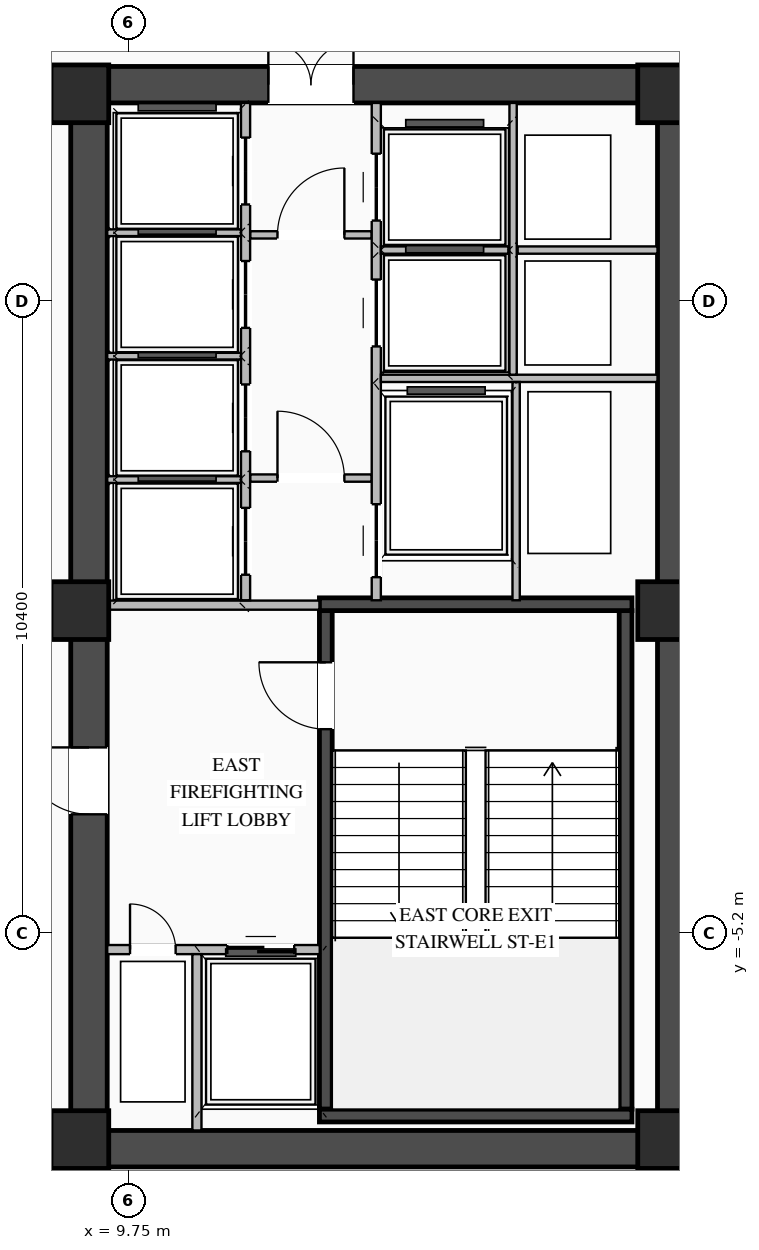
"""IFC4 building model, lengths in metres.
Left out: names, types, materials, properties, quantities, classifications, styles, units other than length and angle.
Written with IfcOpenShell. Run it as: python <this file> out.ifc"""

import sys

from ifc_helpers import new_model, si_unit, direction, frame, frame_2d, origin, origin_2d, place, context, subcontext, project, spatial, rectangle, extrude, element, fill, save


model = new_model("IFC4")
c1 = context("Model", 3, precision=1e-05, world=origin(), true_north=direction((0.0, 1.0)))
c2 = subcontext(c1, "Body", "Model", "MODEL_VIEW")
j1 = project(units=[si_unit("LENGTHUNIT", "METRE"), si_unit("PLANEANGLEUNIT", "RADIAN")], contexts=[c1])
p1 = place(None, origin())
s1 = spatial("IfcSite", under=j1, at=p1, CompositionType="ELEMENT")
p2 = place(p1, origin())
s2 = spatial("IfcBuilding", under=s1, at=p2, CompositionType="ELEMENT")
p3 = place(p2, frame((0.0, 0.0, 116.65)))
s3 = spatial("IfcBuildingStorey", under=s2, at=p3, CompositionType="ELEMENT", Elevation=116.65)
p4 = place(p3, frame((8.8, -8.75, 0.0), z_axis=(0.0, 0.0, 1.0), x_axis=(1.0, 0.0, 0.0)))
e1 = element("IfcWall", 1, at=p4, inside=s3, PredefinedType="SHEAR", context=c2, shape_type="SweptSolid", body=[
    extrude(rectangle(XDim=10.25, YDim=0.6, at=frame_2d((5.125, 0.0))), origin(), (0.0, 0.0, 1.0), 4.02),
])
p5 = place(p3, frame((8.8, 8.75, 0.0), z_axis=(0.0, 0.0, 1.0), x_axis=(1.0, 0.0, 0.0)))
e2 = element("IfcWall", 2, at=p5, inside=s3, PredefinedType="SHEAR", context=c2, shape_type="SweptSolid", body=[
    extrude(rectangle(XDim=10.25, YDim=0.6, at=frame_2d((5.125, 0.0))), origin(), (0.0, 0.0, 1.0), 4.02),
])
p6 = place(p5, frame((3.25, 0.0, 0.0)))
e3 = element("IfcOpeningElement", 3, at=p6, cuts=e2, PredefinedType="OPENING", context=c2, shape_type="SweptSolid", body=[
    extrude(rectangle(XDim=1.4, YDim=2.05, at=frame_2d((0.7, 1.025))), frame((0.0, 0.31, 0.0), z_axis=(0.0, -1.0, 0.0), x_axis=(1.0, 0.0, 0.0)), (0.0, 0.0, 1.0), 0.62),
])
p7 = place(p3, frame((9.1, -8.45, 0.0), z_axis=(0.0, 0.0, 1.0), x_axis=(0.0, 1.0, 0.0)))
e4 = element("IfcWall", 4, at=p7, inside=s3, PredefinedType="SHEAR", context=c2, shape_type="SweptSolid", body=[
    extrude(rectangle(XDim=16.9, YDim=0.6, at=frame_2d((8.45, 0.0))), origin(), (0.0, 0.0, 1.0), 4.02),
])
p8 = place(p7, frame((5.2, 0.0, 0.0)))
e5 = element("IfcOpeningElement", 5, at=p8, cuts=e4, PredefinedType="OPENING", context=c2, shape_type="SweptSolid", body=[
    extrude(rectangle(XDim=1.1, YDim=2.08, at=frame_2d((0.55, 1.04))), frame((0.0, 0.31, 0.0), z_axis=(0.0, -1.0, 0.0), x_axis=(1.0, 0.0, 0.0)), (0.0, 0.0, 1.0), 0.62),
])
p9 = place(p3, frame((18.75, -8.45, 0.0), z_axis=(0.0, 0.0, 1.0), x_axis=(0.0, 1.0, 0.0)))
e6 = element("IfcWall", 6, at=p9, inside=s3, PredefinedType="SHEAR", context=c2, shape_type="SweptSolid", body=[
    extrude(rectangle(XDim=16.9, YDim=0.6, at=frame_2d((8.45, 0.0))), origin(), (0.0, 0.0, 1.0), 4.02),
])
p10 = place(p3, frame((12.995, -8.1, 0.0), z_axis=(0.0, 0.0, 1.0), x_axis=(0.0, 1.0, 0.0)))
e7 = element("IfcWall", 7, at=p10, inside=s3, PredefinedType="SHEAR", context=c2, shape_type="SweptSolid", body=[
    extrude(rectangle(XDim=8.2, YDim=0.21, at=frame_2d((4.1, 0.0))), origin(), (0.0, 0.0, 1.0), 4.02),
])
p11 = place(p10, frame((6.25, 0.0, 0.0)))
e8 = element("IfcOpeningElement", 8, at=p11, cuts=e7, PredefinedType="OPENING", context=c2, shape_type="SweptSolid", body=[
    extrude(rectangle(XDim=1.1, YDim=2.15, at=frame_2d((0.55, 1.075))), frame((0.0, 0.115, 0.0), z_axis=(0.0, -1.0, 0.0), x_axis=(1.0, 0.0, 0.0)), (0.0, 0.0, 1.0), 0.23),
])
p12 = place(p3, frame((17.925, -8.1, 0.0), z_axis=(0.0, 0.0, 1.0), x_axis=(0.0, 1.0, 0.0)))
e9 = element("IfcWall", 9, at=p12, inside=s3, PredefinedType="SHEAR", context=c2, shape_type="SweptSolid", body=[
    extrude(rectangle(XDim=8.2, YDim=0.21, at=frame_2d((4.1, 0.0))), origin(), (0.0, 0.0, 1.0), 4.02),
])
for number, where, z_axis, x_axis in (
    (10, (12.89, -8.205, 0.0), (0.0, 0.0, 1.0), (1.0, 0.0, 0.0)),
    (11, (18.03, 0.205, 0.0), (0.0, 0.0, 1.0), (-1.0, 0.0, 0.0)),
):
    element("IfcWall", number, at=place(p3, frame(where, z_axis=z_axis, x_axis=x_axis)), inside=s3, PredefinedType="SHEAR", context=c2, shape_type="SweptSolid", body=[
        extrude(rectangle(XDim=5.14, YDim=0.21, at=frame_2d((2.57, 0.0))), origin(), (0.0, 0.0, 1.0), 4.02),
    ])
for number, where, z_axis, x_axis in (
    (12, (8.95, -8.6, 0.0), (0.0, 0.0, 1.0), (1.0, 0.0, 0.0)),
    (13, (8.95, 0.1, 0.0), (0.0, 0.0, 1.0), (1.0, 0.0, 0.0)),
    (14, (8.95, 8.6, 0.0), (0.0, 0.0, 1.0), (1.0, 0.0, 0.0)),
    (15, (18.6, -8.6, 0.0), (0.0, 0.0, 1.0), (1.0, 0.0, 0.0)),
    (16, (18.6, 0.1, 0.0), (0.0, 0.0, 1.0), (1.0, 0.0, 0.0)),
    (17, (18.6, 8.6, 0.0), (0.0, 0.0, 1.0), (1.0, 0.0, 0.0)),
):
    element("IfcColumn", number, at=place(p3, frame(where, z_axis=z_axis, x_axis=x_axis)), inside=s3, PredefinedType="COLUMN", context=c2, shape_type="SweptSolid", body=[
        extrude(rectangle(XDim=0.95, YDim=0.95, at=origin_2d()), origin(), (0.0, 0.0, 1.0), 4.2),
    ])
p13 = place(p3, frame((9.4, -5.475, 0.0), z_axis=(0.0, 0.0, 1.0), x_axis=(1.0, 0.0, 0.0)))
e18 = element("IfcWall", 18, at=p13, inside=s3, PredefinedType="STANDARD", context=c2, shape_type="SweptSolid", body=[
    extrude(rectangle(XDim=3.495, YDim=0.15, at=frame_2d((1.748, 0.0))), origin(), (0.0, 0.0, 1.0), 4.0),
])
p14 = place(p13, frame((1.975, 0.0, 0.0)))
e19 = element("IfcOpeningElement", 19, at=p14, cuts=e18, PredefinedType="OPENING", context=c2, shape_type="SweptSolid", body=[
    extrude(rectangle(XDim=1.1, YDim=2.15, at=frame_2d((0.55, 1.075))), frame((0.0, 0.085, 0.0), z_axis=(0.0, -1.0, 0.0), x_axis=(1.0, 0.0, 0.0)), (0.0, 0.0, 1.0), 0.17),
])
p15 = place(p13, frame((0.375, 0.0, 0.0)))
e20 = element("IfcOpeningElement", 20, at=p15, cuts=e18, PredefinedType="OPENING", context=c2, shape_type="SweptSolid", body=[
    extrude(rectangle(XDim=0.75, YDim=2.05, at=frame_2d((0.375, 1.025))), frame((0.0, 0.085, 0.0), z_axis=(0.0, -1.0, 0.0), x_axis=(1.0, 0.0, 0.0)), (0.0, 0.0, 1.0), 0.17),
])
p16 = place(p3, frame((10.875, -8.45, 0.0), z_axis=(0.0, 0.0, 1.0), x_axis=(0.0, 1.0, 0.0)))
e21 = element("IfcWall", 21, at=p16, inside=s3, PredefinedType="STANDARD", context=c2, shape_type="SweptSolid", body=[
    extrude(rectangle(XDim=2.9, YDim=0.15, at=frame_2d((1.45, 0.0))), origin(), (0.0, 0.0, 1.0), 4.0),
])
p17 = place(p3, frame((9.4, 0.19, 0.0), z_axis=(0.0, 0.0, 1.0), x_axis=(1.0, 0.0, 0.0)))
e22 = element("IfcWall", 22, at=p17, inside=s3, PredefinedType="STANDARD", context=c2, shape_type="SweptSolid", body=[
    extrude(rectangle(XDim=3.49, YDim=0.15, at=frame_2d((1.745, 0.0))), origin(), (0.0, 0.0, 1.0), 3.395),
])
p18 = place(p3, frame((11.75, 2.28, 0.0), z_axis=(0.0, 0.0, 1.0), x_axis=(1.0, 0.0, 0.0)))
e23 = element("IfcWall", 23, at=p18, inside=s3, PredefinedType="STANDARD", context=c2, shape_type="SweptSolid", body=[
    extrude(rectangle(XDim=2.0, YDim=0.12, at=frame_2d((1.0, 0.0))), origin(), (0.0, 0.0, 1.0), 4.0),
])
p19 = place(p18, frame((0.45, 0.0, 0.0)))
e24 = element("IfcOpeningElement", 24, at=p19, cuts=e23, PredefinedType="OPENING", context=c2, shape_type="SweptSolid", body=[
    extrude(rectangle(XDim=1.1, YDim=2.1, at=frame_2d((0.55, 1.05))), frame((0.0, 0.07, 0.0), z_axis=(0.0, -1.0, 0.0), x_axis=(1.0, 0.0, 0.0)), (0.0, 0.0, 1.0), 0.14),
])
p20 = place(p3, frame((11.75, 6.28, 0.0), z_axis=(0.0, 0.0, 1.0), x_axis=(1.0, 0.0, 0.0)))
e25 = element("IfcWall", 25, at=p20, inside=s3, PredefinedType="STANDARD", context=c2, shape_type="SweptSolid", body=[
    extrude(rectangle(XDim=2.0, YDim=0.12, at=frame_2d((1.0, 0.0))), origin(), (0.0, 0.0, 1.0), 4.0),
])
p21 = place(p20, frame((0.45, 0.0, 0.0)))
e26 = element("IfcOpeningElement", 26, at=p21, cuts=e25, PredefinedType="OPENING", context=c2, shape_type="SweptSolid", body=[
    extrude(rectangle(XDim=1.1, YDim=2.1, at=frame_2d((0.55, 1.05))), frame((0.0, 0.07, 0.0), z_axis=(0.0, -1.0, 0.0), x_axis=(1.0, 0.0, 0.0)), (0.0, 0.0, 1.0), 0.14),
])
p22 = place(p3, frame((11.675, 0.27, 0.0), z_axis=(0.0, 0.0, 1.0), x_axis=(0.0, 1.0, 0.0)))
e27 = element("IfcWall", 27, at=p22, inside=s3, PredefinedType="STANDARD", context=c2, shape_type="SweptSolid", body=[
    extrude(rectangle(XDim=8.18, YDim=0.15, at=frame_2d((4.09, 0.0))), origin(), (0.0, 0.0, 1.0), 4.0),
])
p23 = place(p22, frame((0.42, 0.0, 0.0)))
e28 = element("IfcOpeningElement", 28, at=p23, cuts=e27, PredefinedType="OPENING", context=c2, shape_type="SweptSolid", body=[
    extrude(rectangle(XDim=1.1, YDim=2.1, at=frame_2d((0.55, 1.05))), frame((0.0, 0.085, 0.0), z_axis=(0.0, -1.0, 0.0), x_axis=(1.0, 0.0, 0.0)), (0.0, 0.0, 1.0), 0.17),
])
p24 = place(p22, frame((2.45, 0.0, 0.0)))
e29 = element("IfcOpeningElement", 29, at=p24, cuts=e27, PredefinedType="OPENING", context=c2, shape_type="SweptSolid", body=[
    extrude(rectangle(XDim=1.1, YDim=2.1, at=frame_2d((0.55, 1.05))), frame((0.0, 0.085, 0.0), z_axis=(0.0, -1.0, 0.0), x_axis=(1.0, 0.0, 0.0)), (0.0, 0.0, 1.0), 0.17),
])
p25 = place(p22, frame((4.48, 0.0, 0.0)))
e30 = element("IfcOpeningElement", 30, at=p25, cuts=e27, PredefinedType="OPENING", context=c2, shape_type="SweptSolid", body=[
    extrude(rectangle(XDim=1.1, YDim=2.1, at=frame_2d((0.55, 1.05))), frame((0.0, 0.085, 0.0), z_axis=(0.0, -1.0, 0.0), x_axis=(1.0, 0.0, 0.0)), (0.0, 0.0, 1.0), 0.17),
])
p26 = place(p22, frame((6.51, 0.0, 0.0)))
e31 = element("IfcOpeningElement", 31, at=p26, cuts=e27, PredefinedType="OPENING", context=c2, shape_type="SweptSolid", body=[
    extrude(rectangle(XDim=1.1, YDim=2.1, at=frame_2d((0.55, 1.05))), frame((0.0, 0.085, 0.0), z_axis=(0.0, -1.0, 0.0), x_axis=(1.0, 0.0, 0.0)), (0.0, 0.0, 1.0), 0.17),
])
for number, where, z_axis, x_axis in (
    (32, (9.4, 2.255, 0.0), (0.0, 0.0, 1.0), (1.0, 0.0, 0.0)),
    (33, (9.4, 4.285, 0.0), (0.0, 0.0, 1.0), (1.0, 0.0, 0.0)),
    (34, (9.4, 6.315, 0.0), (0.0, 0.0, 1.0), (1.0, 0.0, 0.0)),
):
    element("IfcWall", number, at=place(p3, frame(where, z_axis=z_axis, x_axis=x_axis)), inside=s3, PredefinedType="STANDARD", context=c2, shape_type="SweptSolid", body=[
        extrude(rectangle(XDim=2.2, YDim=0.11, at=frame_2d((1.1, 0.0))), origin(), (0.0, 0.0, 1.0), 4.0),
    ])
p27 = place(p3, frame((13.825, 0.27, 0.0), z_axis=(0.0, 0.0, 1.0), x_axis=(0.0, 1.0, 0.0)))
e35 = element("IfcWall", 35, at=p27, inside=s3, PredefinedType="STANDARD", context=c2, shape_type="SweptSolid", body=[
    extrude(rectangle(XDim=8.18, YDim=0.15, at=frame_2d((4.09, 0.0))), origin(), (0.0, 0.0, 1.0), 4.0),
])
p28 = place(p27, frame((4.175, 0.0, 0.0)))
e36 = element("IfcOpeningElement", 36, at=p28, cuts=e35, PredefinedType="OPENING", context=c2, shape_type="SweptSolid", body=[
    extrude(rectangle(XDim=1.1, YDim=2.1, at=frame_2d((0.55, 1.05))), frame((0.0, 0.085, 0.0), z_axis=(0.0, -1.0, 0.0), x_axis=(1.0, 0.0, 0.0)), (0.0, 0.0, 1.0), 0.17),
])
p29 = place(p27, frame((6.245, 0.0, 0.0)))
e37 = element("IfcOpeningElement", 37, at=p29, cuts=e35, PredefinedType="OPENING", context=c2, shape_type="SweptSolid", body=[
    extrude(rectangle(XDim=1.1, YDim=2.1, at=frame_2d((0.55, 1.05))), frame((0.0, 0.085, 0.0), z_axis=(0.0, -1.0, 0.0), x_axis=(1.0, 0.0, 0.0)), (0.0, 0.0, 1.0), 0.17),
])
p30 = place(p27, frame((0.38, 0.0, 0.0)))
e38 = element("IfcOpeningElement", 38, at=p30, cuts=e35, PredefinedType="OPENING", context=c2, shape_type="SweptSolid", body=[
    extrude(rectangle(XDim=1.2, YDim=2.1, at=frame_2d((0.6, 1.05))), frame((0.0, 0.085, 0.0), z_axis=(0.0, -1.0, 0.0), x_axis=(1.0, 0.0, 0.0)), (0.0, 0.0, 1.0), 0.17),
])
p31 = place(p3, frame((13.9, 3.92, 0.0), z_axis=(0.0, 0.0, 1.0), x_axis=(1.0, 0.0, 0.0)))
e39 = element("IfcWall", 39, at=p31, inside=s3, PredefinedType="STANDARD", context=c2, shape_type="SweptSolid", body=[
    extrude(rectangle(XDim=4.55, YDim=0.12, at=frame_2d((2.275, 0.0))), origin(), (0.0, 0.0, 1.0), 4.0),
])
p32 = place(p3, frame((16.15, 6.03, 0.0), z_axis=(0.0, 0.0, 1.0), x_axis=(1.0, 0.0, 0.0)))
e40 = element("IfcWall", 40, at=p32, inside=s3, PredefinedType="STANDARD", context=c2, shape_type="SweptSolid", body=[
    extrude(rectangle(XDim=2.3, YDim=0.12, at=frame_2d((1.15, 0.0))), origin(), (0.0, 0.0, 1.0), 4.0),
])
p33 = place(p3, frame((16.075, 3.98, 0.0), z_axis=(0.0, 0.0, 1.0), x_axis=(0.0, 1.0, 0.0)))
e41 = element("IfcWall", 41, at=p33, inside=s3, PredefinedType="STANDARD", context=c2, shape_type="SweptSolid", body=[
    extrude(rectangle(XDim=4.47, YDim=0.12, at=frame_2d((2.235, 0.0))), origin(), (0.0, 0.0, 1.0), 4.0),
])
p34 = place(p3, frame((13.9, 6.03, 0.0), z_axis=(0.0, 0.0, 1.0), x_axis=(1.0, 0.0, 0.0)))
e42 = element("IfcWall", 42, at=p34, inside=s3, PredefinedType="STANDARD", context=c2, shape_type="SweptSolid", body=[
    extrude(rectangle(XDim=2.1, YDim=0.12, at=frame_2d((1.05, 0.0))), origin(), (0.0, 0.0, 1.0), 4.0),
])
p35 = place(p3, frame((16.125, 0.27, 0.0), z_axis=(0.0, 0.0, 1.0), x_axis=(0.0, 1.0, 0.0)))
e43 = element("IfcWall", 43, at=p35, inside=s3, PredefinedType="STANDARD", context=c2, shape_type="SweptSolid", body=[
    extrude(rectangle(XDim=3.59, YDim=0.12, at=frame_2d((1.795, 0.0))), origin(), (0.0, 0.0, 1.0), 4.0),
])
p36 = place(p11, origin())
e44 = element("IfcDoor", 44, at=p36, inside=s3, OperationType="SINGLE_SWING_RIGHT", PredefinedType="DOOR", context=c2, shape_type="SweptSolid", body=[
    extrude(rectangle(XDim=1.1, YDim=2.15, at=frame_2d((0.55, 1.075))), frame((0.0, 0.025, 0.0), z_axis=(0.0, -1.0, 0.0), x_axis=(1.0, 0.0, 0.0)), (0.0, 0.0, 1.0), 0.05),
])
fill(e8, e44)
p37 = place(p14, origin())
e45 = element("IfcDoor", 45, at=p37, inside=s3, OperationType="DOUBLE_DOOR_SLIDING", PredefinedType="DOOR", context=c2, shape_type="SweptSolid", body=[
    extrude(rectangle(XDim=1.1, YDim=2.15, at=frame_2d((0.55, 1.075))), frame((0.0, 0.025, 0.0), z_axis=(0.0, -1.0, 0.0), x_axis=(1.0, 0.0, 0.0)), (0.0, 0.0, 1.0), 0.05),
])
fill(e19, e45)
p38 = place(p15, origin())
e46 = element("IfcDoor", 46, at=p38, inside=s3, OperationType="SINGLE_SWING_LEFT", PredefinedType="DOOR", context=c2, shape_type="SweptSolid", body=[
    extrude(rectangle(XDim=0.75, YDim=2.05, at=frame_2d((0.375, 1.025))), frame((0.0, 0.025, 0.0), z_axis=(0.0, -1.0, 0.0), x_axis=(1.0, 0.0, 0.0)), (0.0, 0.0, 1.0), 0.05),
])
fill(e20, e46)
p39 = place(p8, origin())
e47 = element("IfcDoor", 47, at=p39, inside=s3, OperationType="SINGLE_SWING_RIGHT", PredefinedType="DOOR", context=c2, shape_type="SweptSolid", body=[
    extrude(rectangle(XDim=1.1, YDim=2.08, at=frame_2d((0.55, 1.04))), frame((0.0, -0.205, 0.0), z_axis=(0.0, -1.0, 0.0), x_axis=(1.0, 0.0, 0.0)), (0.0, 0.0, 1.0), 0.05),
])
fill(e5, e47)
p40 = place(p19, origin())
e48 = element("IfcDoor", 48, at=p40, inside=s3, OperationType="SINGLE_SWING_LEFT", PredefinedType="DOOR", context=c2, shape_type="SweptSolid", body=[
    extrude(rectangle(XDim=1.1, YDim=2.1, at=frame_2d((0.55, 1.05))), frame((0.0, 0.025, 0.0), z_axis=(0.0, -1.0, 0.0), x_axis=(1.0, 0.0, 0.0)), (0.0, 0.0, 1.0), 0.05),
])
fill(e24, e48)
p41 = place(p21, origin())
e49 = element("IfcDoor", 49, at=p41, inside=s3, OperationType="SINGLE_SWING_RIGHT", PredefinedType="DOOR", context=c2, shape_type="SweptSolid", body=[
    extrude(rectangle(XDim=1.1, YDim=2.1, at=frame_2d((0.55, 1.05))), frame((0.0, 0.025, 0.0), z_axis=(0.0, -1.0, 0.0), x_axis=(1.0, 0.0, 0.0)), (0.0, 0.0, 1.0), 0.05),
])
fill(e26, e49)
p42 = place(p6, origin())
e50 = element("IfcDoor", 50, at=p42, inside=s3, OperationType="DOUBLE_DOOR_SINGLE_SWING", PredefinedType="DOOR", context=c2, shape_type="SweptSolid", body=[
    extrude(rectangle(XDim=1.4, YDim=2.05, at=frame_2d((0.7, 1.025))), frame((0.0, 0.245, 0.0), z_axis=(0.0, -1.0, 0.0), x_axis=(1.0, 0.0, 0.0)), (0.0, 0.0, 1.0), 0.05),
])
fill(e3, e50)
p43 = place(p23, origin())
e51 = element("IfcDoor", 51, at=p43, inside=s3, OperationType="DOUBLE_DOOR_SLIDING", PredefinedType="DOOR", context=c2, shape_type="SweptSolid", body=[
    extrude(rectangle(XDim=1.1, YDim=2.1, at=frame_2d((0.55, 1.05))), frame((0.0, 0.025, 0.0), z_axis=(0.0, -1.0, 0.0), x_axis=(1.0, 0.0, 0.0)), (0.0, 0.0, 1.0), 0.05),
])
fill(e28, e51)
p44 = place(p24, origin())
e52 = element("IfcDoor", 52, at=p44, inside=s3, OperationType="DOUBLE_DOOR_SLIDING", PredefinedType="DOOR", context=c2, shape_type="SweptSolid", body=[
    extrude(rectangle(XDim=1.1, YDim=2.1, at=frame_2d((0.55, 1.05))), frame((0.0, 0.025, 0.0), z_axis=(0.0, -1.0, 0.0), x_axis=(1.0, 0.0, 0.0)), (0.0, 0.0, 1.0), 0.05),
])
fill(e29, e52)
p45 = place(p25, origin())
e53 = element("IfcDoor", 53, at=p45, inside=s3, OperationType="DOUBLE_DOOR_SLIDING", PredefinedType="DOOR", context=c2, shape_type="SweptSolid", body=[
    extrude(rectangle(XDim=1.1, YDim=2.1, at=frame_2d((0.55, 1.05))), frame((0.0, 0.025, 0.0), z_axis=(0.0, -1.0, 0.0), x_axis=(1.0, 0.0, 0.0)), (0.0, 0.0, 1.0), 0.05),
])
fill(e30, e53)
p46 = place(p26, origin())
e54 = element("IfcDoor", 54, at=p46, inside=s3, OperationType="DOUBLE_DOOR_SLIDING", PredefinedType="DOOR", context=c2, shape_type="SweptSolid", body=[
    extrude(rectangle(XDim=1.1, YDim=2.1, at=frame_2d((0.55, 1.05))), frame((0.0, 0.025, 0.0), z_axis=(0.0, -1.0, 0.0), x_axis=(1.0, 0.0, 0.0)), (0.0, 0.0, 1.0), 0.05),
])
fill(e31, e54)
p47 = place(p28, origin())
e55 = element("IfcDoor", 55, at=p47, inside=s3, OperationType="DOUBLE_DOOR_SLIDING", PredefinedType="DOOR", context=c2, shape_type="SweptSolid", body=[
    extrude(rectangle(XDim=1.1, YDim=2.1, at=frame_2d((0.55, 1.05))), frame((0.0, 0.025, 0.0), z_axis=(0.0, -1.0, 0.0), x_axis=(1.0, 0.0, 0.0)), (0.0, 0.0, 1.0), 0.05),
])
fill(e36, e55)
p48 = place(p29, origin())
e56 = element("IfcDoor", 56, at=p48, inside=s3, OperationType="DOUBLE_DOOR_SLIDING", PredefinedType="DOOR", context=c2, shape_type="SweptSolid", body=[
    extrude(rectangle(XDim=1.1, YDim=2.1, at=frame_2d((0.55, 1.05))), frame((0.0, 0.025, 0.0), z_axis=(0.0, -1.0, 0.0), x_axis=(1.0, 0.0, 0.0)), (0.0, 0.0, 1.0), 0.05),
])
fill(e37, e56)
p49 = place(p30, origin())
e57 = element("IfcDoor", 57, at=p49, inside=s3, OperationType="DOUBLE_DOOR_SLIDING", PredefinedType="DOOR", context=c2, shape_type="SweptSolid", body=[
    extrude(rectangle(XDim=1.2, YDim=2.1, at=frame_2d((0.6, 1.05))), frame((0.0, 0.025, 0.0), z_axis=(0.0, -1.0, 0.0), x_axis=(1.0, 0.0, 0.0)), (0.0, 0.0, 1.0), 0.05),
])
fill(e38, e57)
save(model, sys.argv[1])
